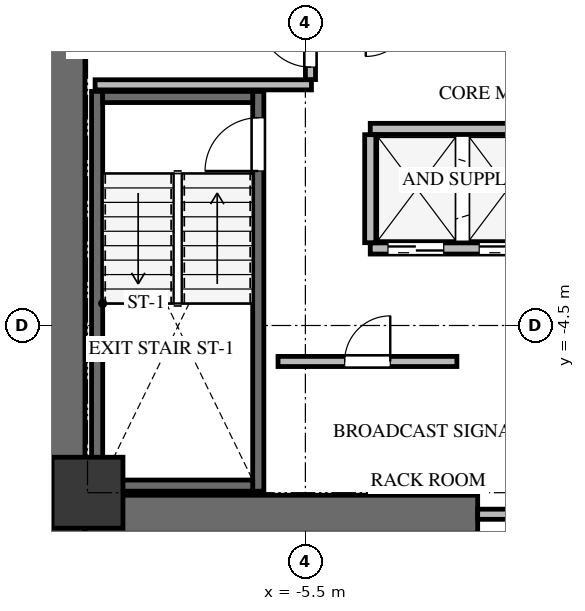
"""IFC4 building model, lengths in metres.
Left out: names, types, materials, properties, quantities, classifications, styles, units other than length and angle.
Written with IfcOpenShell. Run it as: python <this file> out.ifc"""

import sys

from ifc_helpers import new_model, si_unit, direction, frame, frame_2d, origin, origin_2d, place, context, subcontext, project, spatial, rectangle, extrude, source, transform, mapped, element, fill, save


model = new_model("IFC4")
c1 = context("Model", 3, precision=1e-05, world=origin(), true_north=direction((0.0, 1.0)))
c2 = subcontext(c1, "Body", "Model", "MODEL_VIEW")
j1 = project(units=[si_unit("LENGTHUNIT", "METRE"), si_unit("PLANEANGLEUNIT", "RADIAN")], contexts=[c1])
p1 = place(None, origin())
s1 = spatial("IfcSite", under=j1, at=p1, CompositionType="ELEMENT")
p2 = place(p1, origin())
s2 = spatial("IfcBuilding", under=s1, at=p2, CompositionType="ELEMENT")
p3 = place(p2, frame((0.0, 0.0, 117.3)))
s3 = spatial("IfcBuildingStorey", under=s2, at=p3, CompositionType="ELEMENT", Elevation=117.3)
p4 = place(p3, frame((-10.225, -8.6, 0.0), z_axis=(0.0, 0.0, 1.0), x_axis=(0.0, 1.0, 0.0)))
e1 = element("IfcWall", 1, at=p4, inside=s3, PredefinedType="SHEAR", context=c2, shape_type="SweptSolid", body=[
    extrude(rectangle(XDim=17.2, YDim=0.75, at=frame_2d((8.6, 0.0))), origin(), (0.0, 0.0, 1.0), 3.3),
])
p5 = place(p3, frame((-9.85, -8.225, 0.0), z_axis=(0.0, 0.0, 1.0), x_axis=(1.0, 0.0, 0.0)))
e2 = element("IfcWall", 2, at=p5, inside=s3, PredefinedType="SHEAR", context=c2, shape_type="SweptSolid", body=[
    extrude(rectangle(XDim=7.75, YDim=0.75, at=frame_2d((3.875, 0.0))), origin(), (0.0, 0.0, 1.0), 3.3),
])
p6 = place(p3, frame((-6.43, -7.77, -0.24), z_axis=(0.0, 0.0, 1.0), x_axis=(0.0, 1.0, 0.0)))
e3 = element("IfcWall", 3, at=p6, inside=s3, PredefinedType="SHEAR", context=c2, shape_type="SweptSolid", body=[
    extrude(rectangle(XDim=7.89, YDim=0.22, at=frame_2d((3.945, 0.0))), origin(), (0.0, 0.0, 1.0), 3.3),
])
p7 = place(p6, frame((6.32, 0.0, 0.0)))
e4 = element("IfcOpeningElement", 4, at=p7, cuts=e3, PredefinedType="OPENING", context=c2, shape_type="SweptSolid", body=[
    extrude(rectangle(XDim=1.05, YDim=2.15, at=frame_2d((0.525, 1.075))), frame((0.0, 0.12, 0.0), z_axis=(0.0, -1.0, 0.0), x_axis=(1.0, 0.0, 0.0)), (0.0, 0.0, 1.0), 0.24),
])
p8 = place(p3, frame((-9.61, 0.12, -0.24), z_axis=(0.0, 0.0, 1.0), x_axis=(0.0, -1.0, 0.0)))
e5 = element("IfcWall", 5, at=p8, inside=s3, PredefinedType="SHEAR", context=c2, shape_type="SweptSolid", body=[
    extrude(rectangle(XDim=7.89, YDim=0.22, at=frame_2d((3.945, 0.0))), origin(), (0.0, 0.0, 1.0), 3.3),
])
for number, where, z_axis, x_axis in (
    (6, (-9.5, -7.66, -0.24), (0.0, 0.0, 1.0), (1.0, 0.0, 0.0)),
    (7, (-6.54, 0.01, -0.24), (0.0, 0.0, 1.0), (-1.0, 0.0, 0.0)),
):
    element("IfcWall", number, at=place(p3, frame(where, z_axis=z_axis, x_axis=x_axis)), inside=s3, PredefinedType="SHEAR", context=c2, shape_type="SweptSolid", body=[
        extrude(rectangle(XDim=2.96, YDim=0.22, at=frame_2d((1.48, 0.0))), origin(), (0.0, 0.0, 1.0), 3.3),
    ])
m1 = source(origin(), c2, "Body", "SweptSolid", [
    extrude(rectangle(XDim=1.4, YDim=1.4, at=origin_2d()), origin(), (0.0, 0.0, 1.0), 3.3),
])
p9 = place(p3, frame((-9.8, -7.8, -0.24), z_axis=(0.0, 0.0, 1.0), x_axis=(1.0, 0.0, 0.0)))
e8 = element("IfcColumn", 8, at=p9, inside=s3, PredefinedType="COLUMN", context=c2, shape_type="MappedRepresentation", body=[
    mapped(m1, transform((0.0, 0.0, 0.0), x_axis=(1.0, 0.0, 0.0), y_axis=(0.0, 1.0, 0.0), z_axis=(0.0, 0.0, 1.0), scale=1.0)),
])
p10 = place(p3, frame((-2.1, -8.225, 0.0), z_axis=(0.0, 0.0, 1.0), x_axis=(1.0, 0.0, 0.0)))
e9 = element("IfcWall", 9, at=p10, inside=s3, PredefinedType="SOLIDWALL", context=c2, shape_type="SweptSolid", body=[
    extrude(rectangle(XDim=4.2, YDim=0.2, at=frame_2d((2.1, 0.0))), origin(), (0.0, 0.0, 1.0), 3.045),
])
p11 = place(p10, frame((1.2, 0.0, 0.0)))
e10 = element("IfcOpeningElement", 10, at=p11, cuts=e9, PredefinedType="OPENING", context=c2, shape_type="SweptSolid", body=[
    extrude(rectangle(XDim=1.8, YDim=2.15, at=frame_2d((0.9, 1.075))), frame((0.0, 0.11, 0.0), z_axis=(0.0, -1.0, 0.0), x_axis=(1.0, 0.0, 0.0)), (0.0, 0.0, 1.0), 0.22),
])
p12 = place(p3, frame((-9.65, 0.25, 0.0), z_axis=(0.0, 0.0, 1.0), x_axis=(1.0, 0.0, 0.0)))
e11 = element("IfcWall", 11, at=p12, inside=s3, PredefinedType="SOLIDWALL", context=c2, shape_type="SweptSolid", body=[
    extrude(rectangle(XDim=4.27, YDim=0.2, at=frame_2d((2.135, 0.0))), origin(), (0.0, 0.0, 1.0), 3.045),
])
p13 = place(p3, frame((-5.4, 0.354, 0.0), z_axis=(0.0, 0.0, 1.0), x_axis=(0.0, 1.0, 0.0)))
e12 = element("IfcWall", 12, at=p13, inside=s3, PredefinedType="SOLIDWALL", context=c2, shape_type="SweptSolid", body=[
    extrude(rectangle(XDim=4.026, YDim=0.2, at=frame_2d((2.013, 0.0))), origin(), (0.0, 0.0, 1.0), 3.045),
])
p14 = place(p13, frame((0.246, 0.0, 0.0)))
e13 = element("IfcOpeningElement", 13, at=p14, cuts=e12, PredefinedType="OPENING", context=c2, shape_type="SweptSolid", body=[
    extrude(rectangle(XDim=1.0, YDim=2.15, at=frame_2d((0.5, 1.075))), frame((0.0, 0.11, 0.0), z_axis=(0.0, -1.0, 0.0), x_axis=(1.0, 0.0, 0.0)), (0.0, 0.0, 1.0), 0.22),
])
p15 = place(p3, frame((-4.22, -2.98, 0.0), z_axis=(0.0, 0.0, 1.0), x_axis=(1.0, 0.0, 0.0)))
e14 = element("IfcWall", 14, at=p15, inside=s3, PredefinedType="SOLIDWALL", context=c2, shape_type="SweptSolid", body=[
    extrude(rectangle(XDim=7.24, YDim=0.22, at=frame_2d((3.62, 0.0))), origin(), (0.0, 0.0, 1.0), 3.045),
])
p16 = place(p15, frame((0.35, 0.0, 0.0)))
e15 = element("IfcOpeningElement", 15, at=p16, cuts=e14, PredefinedType="OPENING", context=c2, shape_type="SweptSolid", body=[
    extrude(rectangle(XDim=1.1, YDim=2.15, at=frame_2d((0.55, 1.075))), frame((0.0, 0.12, 0.0), z_axis=(0.0, -1.0, 0.0), x_axis=(1.0, 0.0, 0.0)), (0.0, 0.0, 1.0), 0.24),
])
p17 = place(p15, frame((2.15, 0.0, 0.0)))
e16 = element("IfcOpeningElement", 16, at=p17, cuts=e14, PredefinedType="OPENING", context=c2, shape_type="SweptSolid", body=[
    extrude(rectangle(XDim=1.1, YDim=2.15, at=frame_2d((0.55, 1.075))), frame((0.0, 0.12, 0.0), z_axis=(0.0, -1.0, 0.0), x_axis=(1.0, 0.0, 0.0)), (0.0, 0.0, 1.0), 0.24),
])
p18 = place(p15, frame((3.95, 0.0, 0.0)))
e17 = element("IfcOpeningElement", 17, at=p18, cuts=e14, PredefinedType="OPENING", context=c2, shape_type="SweptSolid", body=[
    extrude(rectangle(XDim=1.1, YDim=2.15, at=frame_2d((0.55, 1.075))), frame((0.0, 0.12, 0.0), z_axis=(0.0, -1.0, 0.0), x_axis=(1.0, 0.0, 0.0)), (0.0, 0.0, 1.0), 0.24),
])
p19 = place(p15, frame((5.75, 0.0, 0.0)))
e18 = element("IfcOpeningElement", 18, at=p19, cuts=e14, PredefinedType="OPENING", context=c2, shape_type="SweptSolid", body=[
    extrude(rectangle(XDim=1.1, YDim=2.15, at=frame_2d((0.55, 1.075))), frame((0.0, 0.12, 0.0), z_axis=(0.0, -1.0, 0.0), x_axis=(1.0, 0.0, 0.0)), (0.0, 0.0, 1.0), 0.24),
])
p20 = place(p3, frame((-4.22, -0.62, 0.0), z_axis=(0.0, 0.0, 1.0), x_axis=(1.0, 0.0, 0.0)))
e19 = element("IfcWall", 19, at=p20, inside=s3, PredefinedType="SOLIDWALL", context=c2, shape_type="SweptSolid", body=[
    extrude(rectangle(XDim=7.24, YDim=0.22, at=frame_2d((3.62, 0.0))), origin(), (0.0, 0.0, 1.0), 3.045),
])
p21 = place(p3, frame((-4.22, -2.866, 0.0), z_axis=(0.0, 0.0, 1.0), x_axis=(0.0, 1.0, 0.0)))
e20 = element("IfcWall", 20, at=p21, inside=s3, PredefinedType="SOLIDWALL", context=c2, shape_type="SweptSolid", body=[
    extrude(rectangle(XDim=2.132, YDim=0.22, at=frame_2d((1.066, 0.0))), origin(), (0.0, 0.0, 1.0), 3.045),
])
p22 = place(p3, frame((-6.04, -5.21, 0.0), z_axis=(0.0, 0.0, 1.0), x_axis=(1.0, 0.0, 0.0)))
e21 = element("IfcWall", 21, at=p22, inside=s3, PredefinedType="SOLIDWALL", context=c2, shape_type="SweptSolid", body=[
    extrude(rectangle(XDim=3.53, YDim=0.2, at=frame_2d((1.765, 0.0))), origin(), (0.0, 0.0, 1.0), 3.045),
])
p23 = place(p22, frame((1.315, 0.0, 0.0)))
e22 = element("IfcOpeningElement", 22, at=p23, cuts=e21, PredefinedType="OPENING", context=c2, shape_type="SweptSolid", body=[
    extrude(rectangle(XDim=0.9, YDim=2.05, at=frame_2d((0.45, 1.025))), frame((0.0, 0.11, 0.0), z_axis=(0.0, -1.0, 0.0), x_axis=(1.0, 0.0, 0.0)), (0.0, 0.0, 1.0), 0.22),
])
m2 = source(origin(), c2, "Body", "SweptSolid", [
    extrude(rectangle(XDim=1.05, YDim=2.15, at=frame_2d((0.525, 1.075))), frame((0.0, 0.025, 0.0), z_axis=(0.0, -1.0, 0.0), x_axis=(1.0, 0.0, 0.0)), (0.0, 0.0, 1.0), 0.05),
])
p24 = place(p7, origin())
e23 = element("IfcDoor", 23, at=p24, inside=s3, OperationType="SINGLE_SWING_LEFT", PredefinedType="DOOR", context=c2, shape_type="MappedRepresentation", body=[
    mapped(m2, transform((0.0, 0.0, 0.0), x_axis=(1.0, 0.0, 0.0), y_axis=(0.0, 1.0, 0.0), z_axis=(0.0, 0.0, 1.0), scale=1.0)),
])
fill(e4, e23)
m3 = source(origin(), c2, "Body", "SweptSolid", [
    extrude(rectangle(XDim=1.0, YDim=2.15, at=frame_2d((0.5, 1.075))), frame((0.0, 0.025, 0.0), z_axis=(0.0, -1.0, 0.0), x_axis=(1.0, 0.0, 0.0)), (0.0, 0.0, 1.0), 0.05),
])
p25 = place(p14, origin())
e24 = element("IfcDoor", 24, at=p25, inside=s3, OperationType="SINGLE_SWING_RIGHT", PredefinedType="DOOR", context=c2, shape_type="MappedRepresentation", body=[
    mapped(m3, transform((0.0, 0.0, 0.0), x_axis=(1.0, 0.0, 0.0), y_axis=(0.0, 1.0, 0.0), z_axis=(0.0, 0.0, 1.0), scale=1.0)),
])
fill(e13, e24)
m4 = source(origin(), c2, "Body", "SweptSolid", [
    extrude(rectangle(XDim=1.1, YDim=2.15, at=frame_2d((0.55, 1.075))), frame((0.0, 0.025, 0.0), z_axis=(0.0, -1.0, 0.0), x_axis=(1.0, 0.0, 0.0)), (0.0, 0.0, 1.0), 0.05),
])
p26 = place(p16, origin())
e25 = element("IfcDoor", 25, at=p26, inside=s3, OperationType="DOUBLE_DOOR_SLIDING", PredefinedType="DOOR", context=c2, shape_type="MappedRepresentation", body=[
    mapped(m4, transform((0.0, 0.0, 0.0), x_axis=(1.0, 0.0, 0.0), y_axis=(0.0, 1.0, 0.0), z_axis=(0.0, 0.0, 1.0), scale=1.0)),
])
fill(e15, e25)
p27 = place(p17, origin())
e26 = element("IfcDoor", 26, at=p27, inside=s3, OperationType="DOUBLE_DOOR_SLIDING", PredefinedType="DOOR", context=c2, shape_type="MappedRepresentation", body=[
    mapped(m4, transform((0.0, 0.0, 0.0), x_axis=(1.0, 0.0, 0.0), y_axis=(0.0, 1.0, 0.0), z_axis=(0.0, 0.0, 1.0), scale=1.0)),
])
fill(e16, e26)
m5 = source(origin(), c2, "Body", "SweptSolid", [
    extrude(rectangle(XDim=0.9, YDim=2.05, at=frame_2d((0.45, 1.025))), frame((0.0, 0.025, 0.0), z_axis=(0.0, -1.0, 0.0), x_axis=(1.0, 0.0, 0.0)), (0.0, 0.0, 1.0), 0.05),
])
p28 = place(p23, origin())
e27 = element("IfcDoor", 27, at=p28, inside=s3, OperationType="SINGLE_SWING_RIGHT", PredefinedType="DOOR", context=c2, shape_type="MappedRepresentation", body=[
    mapped(m5, transform((0.0, 0.0, 0.0), x_axis=(1.0, 0.0, 0.0), y_axis=(0.0, 1.0, 0.0), z_axis=(0.0, 0.0, 1.0), scale=1.0)),
])
fill(e22, e27)
save(model, sys.argv[1])
